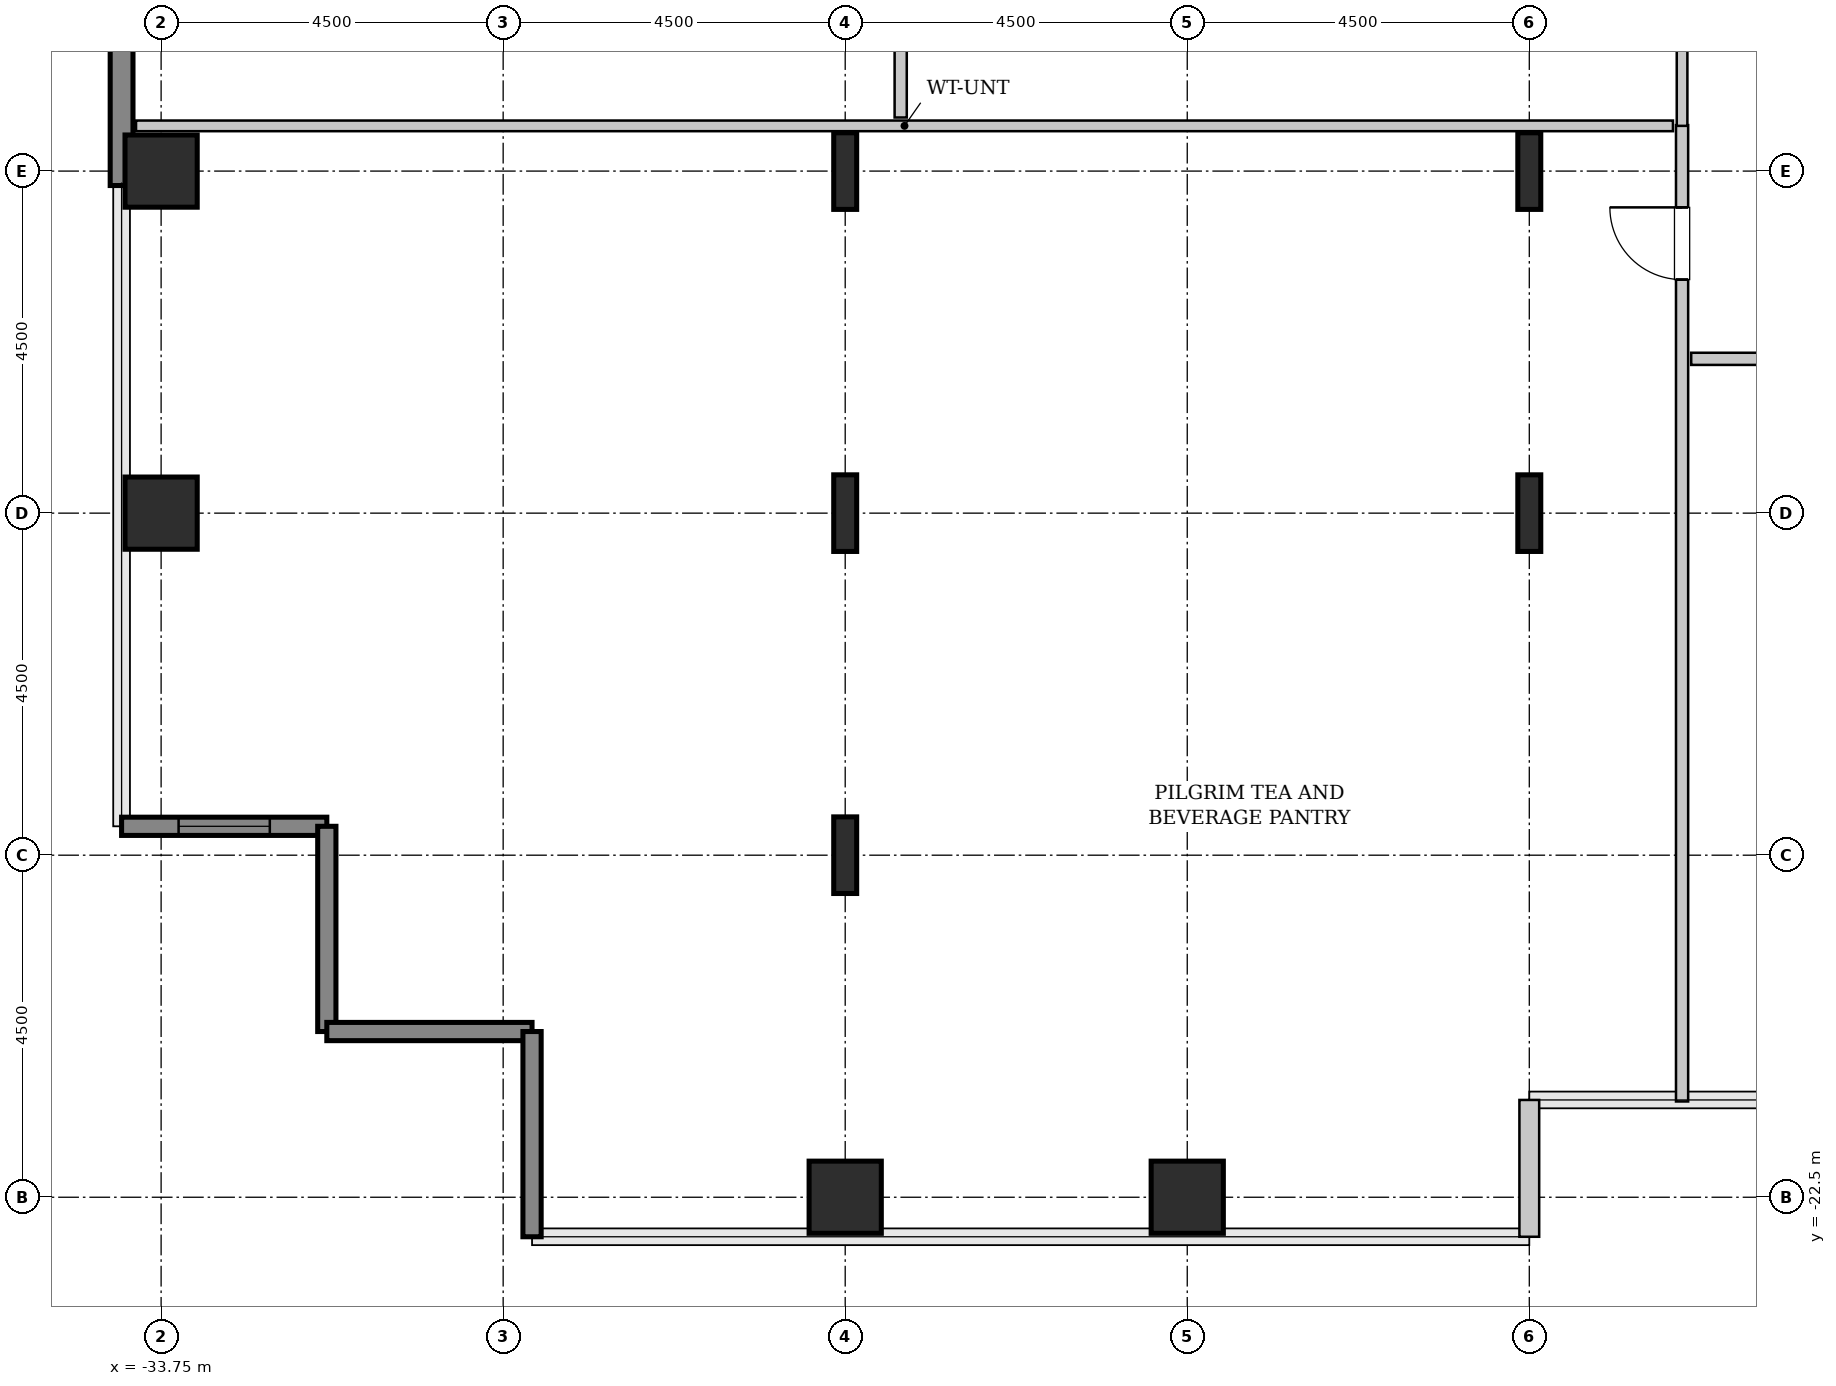
"""IFC4 building model, lengths in metres.
Left out: names, types, materials, properties, quantities, classifications, styles, units other than length and angle.
Written with IfcOpenShell. Run it as: python <this file> out.ifc"""

import sys

from ifc_helpers import new_model, si_unit, direction, frame, frame_2d, origin, origin_2d, place, context, subcontext, project, spatial, rectangle, hollow_rectangle, i_section, extrude, source, transform, mapped, element, fill, save


model = new_model("IFC4")
c1 = context("Model", 3, precision=1e-05, world=origin(), true_north=direction((0.0, 1.0)))
c2 = subcontext(c1, "Body", "Model", "MODEL_VIEW")
j1 = project(units=[si_unit("LENGTHUNIT", "METRE"), si_unit("PLANEANGLEUNIT", "RADIAN")], contexts=[c1])
p1 = place(None, origin())
s1 = spatial("IfcSite", under=j1, at=p1, CompositionType="ELEMENT")
p2 = place(p1, origin())
s2 = spatial("IfcBuilding", under=s1, at=p2, CompositionType="ELEMENT")
p3 = place(p2, frame((0.0, 0.0, 90.8)))
s3 = spatial("IfcBuildingStorey", under=s2, at=p3, CompositionType="ELEMENT", Elevation=90.8)
m1 = source(origin(), c2, "Body", "SweptSolid", [
    extrude(hollow_rectangle(XDim=0.95, YDim=0.95, WallThickness=0.045, InnerFilletRadius=0.045, OuterFilletRadius=0.09, at=origin_2d()), origin(), (0.0, 0.0, 1.0), 3.8),
])
for number, where, z_axis, x_axis in (
    (1, (-33.75, -13.5, 0.0), (0.0, 0.0, 1.0), (1.0, 0.0, 0.0)),
    (2, (-33.75, -9.0, 0.0), (0.0, 0.0, 1.0), (1.0, 0.0, 0.0)),
    (3, (-24.75, -22.5, 0.0), (0.0, 0.0, 1.0), (1.0, 0.0, 0.0)),
):
    element("IfcColumn", number, at=place(p3, frame(where, z_axis=z_axis, x_axis=x_axis)), inside=s3, PredefinedType="COLUMN", context=c2, shape_type="MappedRepresentation", body=[
        mapped(m1, transform((0.0, 0.0, 0.0), x_axis=(1.0, 0.0, 0.0), y_axis=(0.0, 1.0, 0.0), z_axis=(0.0, 0.0, 1.0), scale=1.0)),
    ])
m2 = source(origin(), c2, "Body", "SweptSolid", [
    extrude(i_section(OverallWidth=0.302, OverallDepth=1.008, WebThickness=0.021, FlangeThickness=0.04, FilletRadius=0.03, at=origin_2d()), origin(), (0.0, 0.0, 1.0), 3.8),
])
for number, where, z_axis, x_axis in (
    (4, (-24.75, -18.0, 0.0), (0.0, 0.0, 1.0), (1.0, 0.0, 0.0)),
    (5, (-24.75, -13.5, 0.0), (0.0, 0.0, 1.0), (1.0, 0.0, 0.0)),
    (6, (-24.75, -9.0, 0.0), (0.0, 0.0, 1.0), (1.0, 0.0, 0.0)),
):
    element("IfcColumn", number, at=place(p3, frame(where, z_axis=z_axis, x_axis=x_axis)), inside=s3, PredefinedType="COLUMN", context=c2, shape_type="MappedRepresentation", body=[
        mapped(m2, transform((0.0, 0.0, 0.0), x_axis=(1.0, 0.0, 0.0), y_axis=(0.0, 1.0, 0.0), z_axis=(0.0, 0.0, 1.0), scale=1.0)),
    ])
p4 = place(p3, frame((-20.25, -22.5, 0.0), z_axis=(0.0, 0.0, 1.0), x_axis=(1.0, 0.0, 0.0)))
e7 = element("IfcColumn", 7, at=p4, inside=s3, PredefinedType="COLUMN", context=c2, shape_type="MappedRepresentation", body=[
    mapped(m1, transform((0.0, 0.0, 0.0), x_axis=(1.0, 0.0, 0.0), y_axis=(0.0, 1.0, 0.0), z_axis=(0.0, 0.0, 1.0), scale=1.0)),
])
for number, where, z_axis, x_axis in (
    (8, (-15.75, -13.5, 0.0), (0.0, 0.0, 1.0), (1.0, 0.0, 0.0)),
    (9, (-15.75, -9.0, 0.0), (0.0, 0.0, 1.0), (1.0, 0.0, 0.0)),
):
    element("IfcColumn", number, at=place(p3, frame(where, z_axis=z_axis, x_axis=x_axis)), inside=s3, PredefinedType="COLUMN", context=c2, shape_type="MappedRepresentation", body=[
        mapped(m2, transform((0.0, 0.0, 0.0), x_axis=(1.0, 0.0, 0.0), y_axis=(0.0, 1.0, 0.0), z_axis=(0.0, 0.0, 1.0), scale=1.0)),
    ])
m3 = source(origin(), c2, "Body", "SweptSolid", [
    extrude(rectangle(XDim=4.88, YDim=0.3, at=frame_2d((2.44, 0.0))), origin(), (0.0, 0.0, 1.0), 3.55),
])
p5 = place(p3, frame((-34.27, -9.19, 0.0), z_axis=(0.0, 0.0, 1.0), x_axis=(0.0, 1.0, 0.0)))
e10 = element("IfcWall", 10, at=p5, inside=s3, PredefinedType="SHEAR", context=c2, shape_type="MappedRepresentation", body=[
    mapped(m3, transform((0.0, 0.0, 0.0), x_axis=(1.0, 0.0, 0.0), y_axis=(0.0, 1.0, 0.0), z_axis=(0.0, 0.0, 1.0), scale=1.0)),
])
m4 = source(origin(), c2, "Body", "SweptSolid", [
    extrude(rectangle(XDim=2.7, YDim=0.24, at=frame_2d((1.35, 0.0))), origin(), (0.0, 0.0, 1.0), 3.55),
])
p6 = place(p3, frame((-34.27, -17.62, 0.0), z_axis=(0.0, 0.0, 1.0), x_axis=(1.0, 0.0, 0.0)))
e11 = element("IfcWall", 11, at=p6, inside=s3, PredefinedType="SHEAR", context=c2, shape_type="MappedRepresentation", body=[
    mapped(m4, transform((0.0, 0.0, 0.0), x_axis=(1.0, 0.0, 0.0), y_axis=(0.0, 1.0, 0.0), z_axis=(0.0, 0.0, 1.0), scale=1.0)),
])
p7 = place(p6, frame((0.75, 0.0, 0.85)))
e12 = element("IfcOpeningElement", 12, at=p7, cuts=e11, PredefinedType="OPENING", context=c2, shape_type="SweptSolid", body=[
    extrude(rectangle(XDim=1.2, YDim=1.8, at=frame_2d((0.6, 0.9))), frame((0.0, 0.13, 0.0), z_axis=(0.0, -1.0, 0.0), x_axis=(1.0, 0.0, 0.0)), (0.0, 0.0, 1.0), 0.26),
])
for number, where, z_axis, x_axis in (
    (13, (-31.57, -17.62, 0.0), (0.0, 0.0, 1.0), (0.0, -1.0, 0.0)),
    (14, (-31.57, -20.32, 0.0), (0.0, 0.0, 1.0), (1.0, 0.0, 0.0)),
    (15, (-28.87, -20.32, 0.0), (0.0, 0.0, 1.0), (0.0, -1.0, 0.0)),
):
    element("IfcWall", number, at=place(p3, frame(where, z_axis=z_axis, x_axis=x_axis)), inside=s3, PredefinedType="SHEAR", context=c2, shape_type="MappedRepresentation", body=[
        mapped(m4, transform((0.0, 0.0, 0.0), x_axis=(1.0, 0.0, 0.0), y_axis=(0.0, 1.0, 0.0), z_axis=(0.0, 0.0, 1.0), scale=1.0)),
    ])
m5 = source(origin(), c2, "Body", "SweptSolid", [
    extrude(rectangle(XDim=1.8, YDim=0.26, at=frame_2d((0.9, 0.0))), origin(), (0.0, 0.0, 1.0), 3.55),
])
p8 = place(p3, frame((-15.75, -23.02, 0.0), z_axis=(0.0, 0.0, 1.0), x_axis=(0.0, 1.0, 0.0)))
e16 = element("IfcWall", 16, at=p8, inside=s3, PredefinedType="SOLIDWALL", context=c2, shape_type="MappedRepresentation", body=[
    mapped(m5, transform((0.0, 0.0, 0.0), x_axis=(1.0, 0.0, 0.0), y_axis=(0.0, 1.0, 0.0), z_axis=(0.0, 0.0, 1.0), scale=1.0)),
])
m6 = source(origin(), c2, "Body", "SweptSolid", [
    extrude(rectangle(XDim=12.845, YDim=0.16, at=frame_2d((6.422, 0.0))), origin(), (0.0, 0.0, 1.0), 3.535),
])
p9 = place(p3, frame((-13.74, -21.24, 0.0), z_axis=(0.0, 0.0, 1.0), x_axis=(0.0, 1.0, 0.0)))
e17 = element("IfcWall", 17, at=p9, inside=s3, PredefinedType="PARTITIONING", context=c2, shape_type="MappedRepresentation", body=[
    mapped(m6, transform((0.0, 0.0, 0.0), x_axis=(1.0, 0.0, 0.0), y_axis=(0.0, 1.0, 0.0), z_axis=(0.0, 0.0, 1.0), scale=1.0)),
])
p10 = place(p9, frame((10.812, 0.0, 0.0)))
e18 = element("IfcOpeningElement", 18, at=p10, cuts=e17, PredefinedType="OPENING", context=c2, shape_type="SweptSolid", body=[
    extrude(rectangle(XDim=0.95, YDim=2.1, at=frame_2d((0.475, 1.05))), frame((0.0, 0.09, 0.0), z_axis=(0.0, -1.0, 0.0), x_axis=(1.0, 0.0, 0.0)), (0.0, 0.0, 1.0), 0.18),
])
m7 = source(origin(), c2, "Body", "SweptSolid", [
    extrude(rectangle(XDim=20.22, YDim=0.14, at=frame_2d((10.11, 0.0))), origin(), (0.0, 0.0, 1.0), 3.535),
])
p11 = place(p3, frame((-34.08, -8.405, 0.0), z_axis=(0.0, 0.0, 1.0), x_axis=(1.0, 0.0, 0.0)))
e19 = element("IfcWall", 19, at=p11, inside=s3, PredefinedType="PARTITIONING", context=c2, shape_type="MappedRepresentation", body=[
    mapped(m7, transform((0.0, 0.0, 0.0), x_axis=(1.0, 0.0, 0.0), y_axis=(0.0, 1.0, 0.0), z_axis=(0.0, 0.0, 1.0), scale=1.0)),
])
m8 = source(origin(), c2, "Body", "SweptSolid", [
    extrude(rectangle(XDim=9.665, YDim=0.14, at=frame_2d((4.833, 0.0))), origin(), (0.0, 0.0, 1.0), 3.535),
])
p12 = place(p3, frame((-13.74, -8.405, 0.0), z_axis=(0.0, 0.0, 1.0), x_axis=(0.0, 1.0, 0.0)))
e20 = element("IfcWall", 20, at=p12, inside=s3, PredefinedType="PARTITIONING", context=c2, shape_type="MappedRepresentation", body=[
    mapped(m8, transform((0.0, 0.0, 0.0), x_axis=(1.0, 0.0, 0.0), y_axis=(0.0, 1.0, 0.0), z_axis=(0.0, 0.0, 1.0), scale=1.0)),
])
m9 = source(origin(), c2, "Body", "SweptSolid", [
    extrude(rectangle(XDim=13.2, YDim=0.16, at=frame_2d((6.6, 0.0))), origin(), (0.0, 0.0, 1.0), 3.535),
])
p13 = place(p3, frame((-24.02, -8.295, 0.0), z_axis=(0.0, 0.0, 1.0), x_axis=(0.0, 1.0, 0.0)))
e21 = element("IfcWall", 21, at=p13, inside=s3, PredefinedType="PARTITIONING", context=c2, shape_type="MappedRepresentation", body=[
    mapped(m9, transform((0.0, 0.0, 0.0), x_axis=(1.0, 0.0, 0.0), y_axis=(0.0, 1.0, 0.0), z_axis=(0.0, 0.0, 1.0), scale=1.0)),
])
p14 = place(p13, frame((10.07, 0.0, 0.0)))
e22 = element("IfcOpeningElement", 22, at=p14, cuts=e21, PredefinedType="OPENING", context=c2, shape_type="SweptSolid", body=[
    extrude(rectangle(XDim=0.95, YDim=2.1, at=frame_2d((0.475, 1.05))), frame((0.0, 0.09, 0.0), z_axis=(0.0, -1.0, 0.0), x_axis=(1.0, 0.0, 0.0)), (0.0, 0.0, 1.0), 0.18),
])
m10 = source(origin(), c2, "Body", "SweptSolid", [
    extrude(rectangle(XDim=5.425, YDim=0.16, at=frame_2d((2.712, 0.0))), origin(), (0.0, 0.0, 1.0), 3.535),
])
p15 = place(p3, frame((-13.62, -11.47, 0.0), z_axis=(0.0, 0.0, 1.0), x_axis=(1.0, 0.0, 0.0)))
e23 = element("IfcWall", 23, at=p15, inside=s3, PredefinedType="PARTITIONING", context=c2, shape_type="MappedRepresentation", body=[
    mapped(m10, transform((0.0, 0.0, 0.0), x_axis=(1.0, 0.0, 0.0), y_axis=(0.0, 1.0, 0.0), z_axis=(0.0, 0.0, 1.0), scale=1.0)),
])
p16 = place(p15, frame((2.238, 0.0, 0.0)))
e24 = element("IfcOpeningElement", 24, at=p16, cuts=e23, PredefinedType="OPENING", context=c2, shape_type="SweptSolid", body=[
    extrude(rectangle(XDim=0.95, YDim=2.1, at=frame_2d((0.475, 1.05))), frame((0.0, 0.09, 0.0), z_axis=(0.0, -1.0, 0.0), x_axis=(1.0, 0.0, 0.0)), (0.0, 0.0, 1.0), 0.18),
])
m11 = source(origin(), c2, "Body", "SweptSolid", [
    extrude(rectangle(XDim=1.2, YDim=1.8, at=frame_2d((0.6, 0.9))), frame((0.0, 0.03, 0.0), z_axis=(0.0, -1.0, 0.0), x_axis=(1.0, 0.0, 0.0)), (0.0, 0.0, 1.0), 0.06),
])
p17 = place(p7, origin())
e25 = element("IfcWindow", 25, at=p17, inside=s3, PartitioningType="SINGLE_PANEL", PredefinedType="WINDOW", context=c2, shape_type="MappedRepresentation", body=[
    mapped(m11, transform((0.0, 0.0, 0.0), x_axis=(1.0, 0.0, 0.0), y_axis=(0.0, 1.0, 0.0), z_axis=(0.0, 0.0, 1.0), scale=1.0)),
])
fill(e12, e25)
m12 = source(origin(), c2, "Body", "SweptSolid", [
    extrude(rectangle(XDim=0.95, YDim=2.1, at=frame_2d((0.475, 1.05))), frame((0.0, 0.025, 0.0), z_axis=(0.0, -1.0, 0.0), x_axis=(1.0, 0.0, 0.0)), (0.0, 0.0, 1.0), 0.05),
])
p18 = place(p10, origin())
e26 = element("IfcDoor", 26, at=p18, inside=s3, OperationType="SINGLE_SWING_RIGHT", PredefinedType="DOOR", context=c2, shape_type="MappedRepresentation", body=[
    mapped(m12, transform((0.0, 0.0, 0.0), x_axis=(1.0, 0.0, 0.0), y_axis=(0.0, 1.0, 0.0), z_axis=(0.0, 0.0, 1.0), scale=1.0)),
])
fill(e18, e26)
save(model, sys.argv[1])
